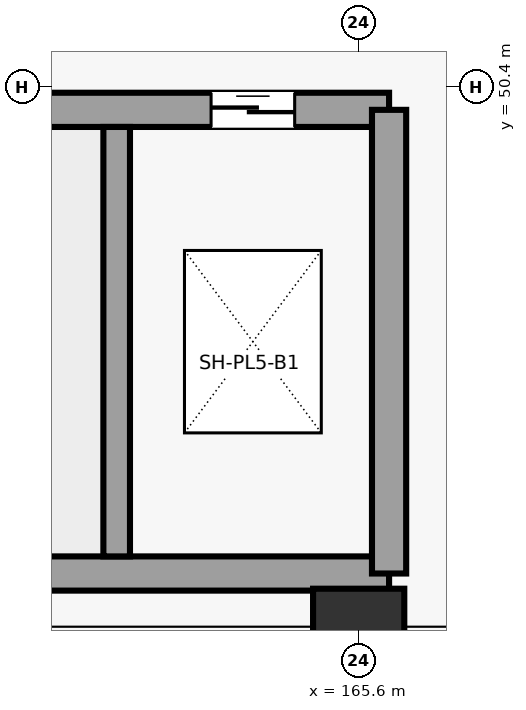
"""IFC4 building model, lengths in metres.
Left out: names, types, materials, properties, quantities, classifications, styles, units other than length and angle.
Written with IfcOpenShell. Run it as: python <this file> out.ifc"""

import sys

from ifc_helpers import new_model, si_unit, direction, frame, frame_2d, origin, origin_2d, place, context, subcontext, project, spatial, rectangle, circle, extrude, element, fill, save


model = new_model("IFC4")
c1 = context("Model", 3, precision=1e-05, world=origin(), true_north=direction((0.0, 1.0)))
c2 = subcontext(c1, "Body", "Model", "MODEL_VIEW")
j1 = project(units=[si_unit("LENGTHUNIT", "METRE"), si_unit("PLANEANGLEUNIT", "RADIAN")], contexts=[c1])
p1 = place(None, origin())
s1 = spatial("IfcSite", under=j1, at=p1, CompositionType="ELEMENT")
p2 = place(p1, origin())
s2 = spatial("IfcBuilding", under=s1, at=p2, CompositionType="ELEMENT")
p3 = place(p2, frame((0.0, 0.0, -5.4)))
s3 = spatial("IfcBuildingStorey", under=s2, at=p3, CompositionType="ELEMENT", Elevation=-5.4)
p4 = place(p3, frame((165.6, 43.2, 0.0), z_axis=(0.0, 0.0, 1.0), x_axis=(1.0, 0.0, 0.0)))
e1 = element("IfcColumn", 1, at=p4, inside=s3, PredefinedType="COLUMN", context=c2, shape_type="SweptSolid", body=[
    extrude(circle(Radius=0.6, at=origin_2d()), origin(), (0.0, 0.0, 1.0), 5.4),
])
p5 = place(p3, frame((153.2, 44.0, 0.0), z_axis=(0.0, 0.0, 1.0), x_axis=(1.0, 0.0, 0.0)))
e2 = element("IfcWall", 2, at=p5, inside=s3, PredefinedType="SHEAR", context=c2, shape_type="SweptSolid", body=[
    extrude(rectangle(XDim=12.8, YDim=0.45, at=frame_2d((6.4, 0.0))), origin(), (0.0, 0.0, 1.0), 5.02),
])
p6 = place(p3, frame((153.2, 50.1, 0.0), z_axis=(0.0, 0.0, 1.0), x_axis=(1.0, 0.0, 0.0)))
e3 = element("IfcWall", 3, at=p6, inside=s3, PredefinedType="SHEAR", context=c2, shape_type="SweptSolid", body=[
    extrude(rectangle(XDim=12.8, YDim=0.45, at=frame_2d((6.4, 0.0))), origin(), (0.0, 0.0, 1.0), 5.02),
])
p7 = place(p6, frame((0.55, 0.0, 0.0)))
e4 = element("IfcOpeningElement", 4, at=p7, cuts=e3, PredefinedType="OPENING", context=c2, shape_type="SweptSolid", body=[
    extrude(rectangle(XDim=1.2, YDim=2.25, at=frame_2d((0.6, 1.125))), frame((0.0, 0.235, 0.0), z_axis=(0.0, -1.0, 0.0), x_axis=(1.0, 0.0, 0.0)), (0.0, 0.0, 1.0), 0.47),
])
p8 = place(p6, frame((10.458, 0.0, 0.0)))
e5 = element("IfcOpeningElement", 5, at=p8, cuts=e3, PredefinedType="OPENING", context=c2, shape_type="SweptSolid", body=[
    extrude(rectangle(XDim=1.1, YDim=2.2, at=frame_2d((0.55, 1.1))), frame((0.0, 0.235, 0.0), z_axis=(0.0, -1.0, 0.0), x_axis=(1.0, 0.0, 0.0)), (0.0, 0.0, 1.0), 0.47),
])
p9 = place(p3, frame((166.0, 44.0, 0.0), z_axis=(0.0, 0.0, 1.0), x_axis=(0.0, 1.0, 0.0)))
e6 = element("IfcWall", 6, at=p9, inside=s3, PredefinedType="SHEAR", context=c2, shape_type="SweptSolid", body=[
    extrude(rectangle(XDim=6.1, YDim=0.45, at=frame_2d((3.05, 0.0))), origin(), (0.0, 0.0, 1.0), 5.02),
])
p10 = place(p3, frame((162.416, 44.225, 0.0), z_axis=(0.0, 0.0, 1.0), x_axis=(0.0, 1.0, 0.0)))
e7 = element("IfcWall", 7, at=p10, inside=s3, PredefinedType="SHEAR", context=c2, shape_type="SweptSolid", body=[
    extrude(rectangle(XDim=5.65, YDim=0.35, at=frame_2d((2.825, 0.0))), origin(), (0.0, 0.0, 1.0), 5.02),
])
p11 = place(p8, origin())
e8 = element("IfcDoor", 8, at=p11, inside=s3, OperationType="SLIDING_TO_LEFT", PredefinedType="DOOR", context=c2, shape_type="SweptSolid", body=[
    extrude(rectangle(XDim=1.1, YDim=2.2, at=frame_2d((0.55, 1.1))), frame((0.0, 0.025, 0.0), z_axis=(0.0, -1.0, 0.0), x_axis=(1.0, 0.0, 0.0)), (0.0, 0.0, 1.0), 0.05),
])
fill(e5, e8)
save(model, sys.argv[1])
